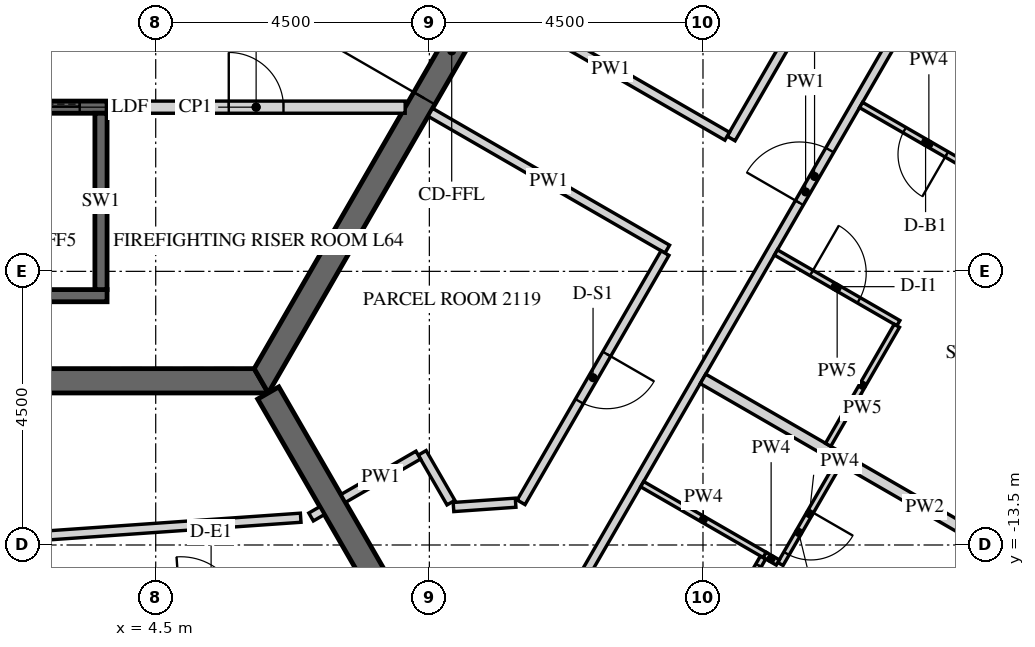
"""IFC4 building model, lengths in metres.
Left out: names, types, materials, properties, quantities, classifications, styles, units other than length and angle.
Written with IfcOpenShell. Run it as: python <this file> out.ifc"""

import sys

from ifc_helpers import new_model, si_unit, direction, frame, frame_2d, origin, place, context, subcontext, project, spatial, polyline, rectangle, outline, extrude, element, fill, save


model = new_model("IFC4")
c1 = context("Model", 3, precision=1e-05, world=origin(), true_north=direction((0.0, 1.0)))
c2 = subcontext(c1, "Body", "Model", "MODEL_VIEW")
j1 = project(units=[si_unit("LENGTHUNIT", "METRE"), si_unit("PLANEANGLEUNIT", "RADIAN")], contexts=[c1])
p1 = place(None, origin())
s1 = spatial("IfcSite", under=j1, at=p1, CompositionType="ELEMENT")
p2 = place(p1, origin())
s2 = spatial("IfcBuilding", under=s1, at=p2, CompositionType="ELEMENT")
p3 = place(p2, frame((0.0, 0.0, 267.9)))
s3 = spatial("IfcBuildingStorey", under=s2, at=p3, CompositionType="ELEMENT", Elevation=267.9)
p4 = place(p3, frame((16.451, -23.005, -0.15), z_axis=(0.0, 0.0, 1.0), x_axis=(0.500003737743, 0.866023245787, 0.0)))
e1 = element("IfcWall", 1, at=p4, inside=s3, PredefinedType="SOLIDWALL", context=c2, shape_type="SweptSolid", body=[
    extrude(outline(polyline([(-0.021, -0.25), (25.468, -0.25), (25.421, 0.25), (0.021, 0.25), (-0.021, -0.25)])), origin(), (0.0, 0.0, 1.0), 3.9),
])
p5 = place(p4, frame((2.522, 0.0, 0.75)))
e2 = element("IfcOpeningElement", 2, at=p5, cuts=e1, PredefinedType="OPENING", context=c2, shape_type="SweptSolid", body=[
    extrude(rectangle(XDim=2.4, YDim=2.7, at=frame_2d((1.2, 1.35))), frame((0.0, 0.26, 0.0), z_axis=(0.0, -1.0, 0.0), x_axis=(1.0, 0.0, 0.0)), (0.0, 0.0, 1.0), 0.52),
])
p6 = place(p4, frame((6.122, 0.0, 0.75)))
e3 = element("IfcOpeningElement", 3, at=p6, cuts=e1, PredefinedType="OPENING", context=c2, shape_type="SweptSolid", body=[
    extrude(rectangle(XDim=2.4, YDim=2.7, at=frame_2d((1.2, 1.35))), frame((0.0, 0.26, 0.0), z_axis=(0.0, -1.0, 0.0), x_axis=(1.0, 0.0, 0.0)), (0.0, 0.0, 1.0), 0.52),
])
p7 = place(p4, frame((9.722, 0.0, 0.75)))
e4 = element("IfcOpeningElement", 4, at=p7, cuts=e1, PredefinedType="OPENING", context=c2, shape_type="SweptSolid", body=[
    extrude(rectangle(XDim=2.4, YDim=2.7, at=frame_2d((1.2, 1.35))), frame((0.0, 0.26, 0.0), z_axis=(0.0, -1.0, 0.0), x_axis=(1.0, 0.0, 0.0)), (0.0, 0.0, 1.0), 0.52),
])
p8 = place(p4, frame((13.323, 0.0, 0.75)))
e5 = element("IfcOpeningElement", 5, at=p8, cuts=e1, PredefinedType="OPENING", context=c2, shape_type="SweptSolid", body=[
    extrude(rectangle(XDim=2.4, YDim=2.7, at=frame_2d((1.2, 1.35))), frame((0.0, 0.26, 0.0), z_axis=(0.0, -1.0, 0.0), x_axis=(1.0, 0.0, 0.0)), (0.0, 0.0, 1.0), 0.52),
])
p9 = place(p4, frame((16.922, 0.0, 0.75)))
e6 = element("IfcOpeningElement", 6, at=p9, cuts=e1, PredefinedType="OPENING", context=c2, shape_type="SweptSolid", body=[
    extrude(rectangle(XDim=2.4, YDim=2.7, at=frame_2d((1.2, 1.35))), frame((0.0, 0.26, 0.0), z_axis=(0.0, -1.0, 0.0), x_axis=(1.0, 0.0, 0.0)), (0.0, 0.0, 1.0), 0.52),
])
p10 = place(p4, frame((20.522, 0.0, 0.75)))
e7 = element("IfcOpeningElement", 7, at=p10, cuts=e1, PredefinedType="OPENING", context=c2, shape_type="SweptSolid", body=[
    extrude(rectangle(XDim=2.4, YDim=2.7, at=frame_2d((1.2, 1.35))), frame((0.0, 0.26, 0.0), z_axis=(0.0, -1.0, 0.0), x_axis=(1.0, 0.0, 0.0)), (0.0, 0.0, 1.0), 0.52),
])
p11 = place(p3, frame((-6.235, -10.8, -0.15), z_axis=(0.0, 0.0, 1.0), x_axis=(1.0, 0.0, 0.0)))
e8 = element("IfcWall", 8, at=p11, inside=s3, PredefinedType="SHEAR", context=c2, shape_type="SweptSolid", body=[
    extrude(outline(polyline([(-0.115, -0.2), (12.586, -0.2), (12.355, 0.2), (0.115, 0.2), (-0.115, -0.2)])), origin(), (0.0, 0.0, 1.0), 3.9),
])
p12 = place(p3, frame((6.235, -10.8, -0.15), z_axis=(0.0, 0.0, 1.0), x_axis=(0.499996419489, 0.866027470984, 0.0)))
e9 = element("IfcWall", 9, at=p12, inside=s3, PredefinedType="SHEAR", context=c2, shape_type="SweptSolid", body=[
    extrude(outline(polyline([(-0.115, -0.2), (12.586, -0.2), (12.355, 0.2), (0.115, 0.2), (-0.115, -0.2)])), origin(), (0.0, 0.0, 1.0), 3.9),
])
p13 = place(p12, frame((5.364, 0.0, 0.15)))
e10 = element("IfcOpeningElement", 10, at=p13, cuts=e9, PredefinedType="OPENING", context=c2, shape_type="SweptSolid", body=[
    extrude(rectangle(XDim=1.8, YDim=2.4, at=frame_2d((0.9, 1.2))), frame((0.0, 0.21, 0.0), z_axis=(0.0, -1.0, 0.0), x_axis=(1.0, 0.0, 0.0)), (0.0, 0.0, 1.0), 0.42),
])
p14 = place(p3, frame((6.351, -11.0, -0.15), z_axis=(0.0, 0.0, 1.0), x_axis=(0.499998894578, -0.866026041999, 0.0)))
e11 = element("IfcWall", 11, at=p14, inside=s3, PredefinedType="SHEAR", context=c2, shape_type="SweptSolid", body=[
    extrude(rectangle(XDim=15.544, YDim=0.4, at=frame_2d((7.772, 0.0))), origin(), (0.0, 0.0, 1.0), 3.9),
])
p15 = place(p14, frame((6.872, 0.0, 0.15)))
e12 = element("IfcOpeningElement", 12, at=p15, cuts=e11, PredefinedType="OPENING", context=c2, shape_type="SweptSolid", body=[
    extrude(rectangle(XDim=1.8, YDim=2.4, at=frame_2d((0.9, 1.2))), frame((0.0, 0.21, 0.0), z_axis=(0.0, -1.0, 0.0), x_axis=(1.0, 0.0, 0.0)), (0.0, 0.0, 1.0), 0.42),
])
p16 = place(p3, frame((-5.5, -6.3, -0.25), z_axis=(0.0, 0.0, 1.0), x_axis=(1.0, 0.0, 0.0)))
e13 = element("IfcWall", 13, at=p16, inside=s3, PredefinedType="SHEAR", context=c2, shape_type="SweptSolid", body=[
    extrude(rectangle(XDim=9.2, YDim=0.2, at=frame_2d((4.6, 0.0))), origin(), (0.0, 0.0, 1.0), 3.9),
])
p17 = place(p16, frame((0.45, 0.0, 0.25)))
e14 = element("IfcOpeningElement", 14, at=p17, cuts=e13, PredefinedType="OPENING", context=c2, shape_type="SweptSolid", body=[
    extrude(rectangle(XDim=1.1, YDim=2.1, at=frame_2d((0.55, 1.05))), frame((0.0, 0.11, 0.0), z_axis=(0.0, -1.0, 0.0), x_axis=(1.0, 0.0, 0.0)), (0.0, 0.0, 1.0), 0.22),
])
p18 = place(p16, frame((2.25, 0.0, 0.25)))
e15 = element("IfcOpeningElement", 15, at=p18, cuts=e13, PredefinedType="OPENING", context=c2, shape_type="SweptSolid", body=[
    extrude(rectangle(XDim=1.1, YDim=2.1, at=frame_2d((0.55, 1.05))), frame((0.0, 0.11, 0.0), z_axis=(0.0, -1.0, 0.0), x_axis=(1.0, 0.0, 0.0)), (0.0, 0.0, 1.0), 0.22),
])
p19 = place(p16, frame((4.05, 0.0, 0.25)))
e16 = element("IfcOpeningElement", 16, at=p19, cuts=e13, PredefinedType="OPENING", context=c2, shape_type="SweptSolid", body=[
    extrude(rectangle(XDim=1.1, YDim=2.1, at=frame_2d((0.55, 1.05))), frame((0.0, 0.11, 0.0), z_axis=(0.0, -1.0, 0.0), x_axis=(1.0, 0.0, 0.0)), (0.0, 0.0, 1.0), 0.22),
])
p20 = place(p16, frame((5.85, 0.0, 0.25)))
e17 = element("IfcOpeningElement", 17, at=p20, cuts=e13, PredefinedType="OPENING", context=c2, shape_type="SweptSolid", body=[
    extrude(rectangle(XDim=1.1, YDim=2.1, at=frame_2d((0.55, 1.05))), frame((0.0, 0.11, 0.0), z_axis=(0.0, -1.0, 0.0), x_axis=(1.0, 0.0, 0.0)), (0.0, 0.0, 1.0), 0.22),
])
p21 = place(p16, frame((7.65, 0.0, 0.25)))
e18 = element("IfcOpeningElement", 18, at=p21, cuts=e13, PredefinedType="OPENING", context=c2, shape_type="SweptSolid", body=[
    extrude(rectangle(XDim=1.1, YDim=2.1, at=frame_2d((0.55, 1.05))), frame((0.0, 0.11, 0.0), z_axis=(0.0, -1.0, 0.0), x_axis=(1.0, 0.0, 0.0)), (0.0, 0.0, 1.0), 0.22),
])
p22 = place(p3, frame((-5.5, -9.4, -0.25), z_axis=(0.0, 0.0, 1.0), x_axis=(1.0, 0.0, 0.0)))
e19 = element("IfcWall", 19, at=p22, inside=s3, PredefinedType="SHEAR", context=c2, shape_type="SweptSolid", body=[
    extrude(rectangle(XDim=9.2, YDim=0.2, at=frame_2d((4.6, 0.0))), origin(), (0.0, 0.0, 1.0), 3.9),
])
p23 = place(p3, frame((3.6, -9.3, -0.25), z_axis=(0.0, 0.0, 1.0), x_axis=(0.0, 1.0, 0.0)))
e20 = element("IfcWall", 20, at=p23, inside=s3, PredefinedType="SHEAR", context=c2, shape_type="SweptSolid", body=[
    extrude(rectangle(XDim=2.9, YDim=0.2, at=frame_2d((1.45, 0.0))), origin(), (0.0, 0.0, 1.0), 3.9),
])
p24 = place(p3, frame((3.7, -6.3, 0.0), z_axis=(0.0, 0.0, 1.0), x_axis=(1.0, 0.0, 0.0)))
e21 = element("IfcWall", 21, at=p24, inside=s3, PredefinedType="PARTITIONING", context=c2, shape_type="SweptSolid", body=[
    extrude(rectangle(XDim=4.903, YDim=0.2, at=frame_2d((2.451, 0.0))), origin(), (0.0, 0.0, 1.0), 3.65),
])
p25 = place(p24, frame((2.001, 0.0, 0.0)))
e22 = element("IfcOpeningElement", 22, at=p25, cuts=e21, PredefinedType="OPENING", context=c2, shape_type="SweptSolid", body=[
    extrude(rectangle(XDim=0.9, YDim=2.1, at=frame_2d((0.45, 1.05))), frame((0.0, 0.11, 0.0), z_axis=(0.0, -1.0, 0.0), x_axis=(1.0, 0.0, 0.0)), (0.0, 0.0, 1.0), 0.22),
])
p26 = place(p3, frame((7.237, -12.935, 0.0), z_axis=(0.0, 0.0, 1.0), x_axis=(-0.866088799389, -0.499890179513, 0.0)))
e23 = element("IfcWall", 23, at=p26, inside=s3, PredefinedType="PARTITIONING", context=c2, shape_type="SweptSolid", body=[
    extrude(rectangle(XDim=0.21, YDim=0.15, at=frame_2d((0.105, 0.0))), origin(), (0.0, 0.0, 1.0), 2.988),
])
p27 = place(p3, frame((6.884, -13.052, 0.0), z_axis=(0.0, 0.0, 1.0), x_axis=(-0.997564224443, -0.069753982764, 0.0)))
e24 = element("IfcWall", 24, at=p27, inside=s3, PredefinedType="PARTITIONING", context=c2, shape_type="SweptSolid", body=[
    extrude(rectangle(XDim=16.618, YDim=0.15, at=frame_2d((8.309, 0.0))), origin(), (0.0, 0.0, 1.0), 2.988),
])
p28 = place(p27, frame((7.859, 0.0, 0.0)))
e25 = element("IfcOpeningElement", 25, at=p28, cuts=e24, PredefinedType="OPENING", context=c2, shape_type="SweptSolid", body=[
    extrude(rectangle(XDim=0.9, YDim=2.1, at=frame_2d((0.45, 1.05))), frame((0.0, 0.085, 0.0), z_axis=(0.0, -1.0, 0.0), x_axis=(1.0, 0.0, 0.0)), (0.0, 0.0, 1.0), 0.17),
])
p29 = place(p3, frame((11.454, -14.16, 0.0), z_axis=(0.0, 0.0, 1.0), x_axis=(0.500000296604, 0.86602523254, 0.0)))
e26 = element("IfcWall", 26, at=p29, inside=s3, PredefinedType="PARTITIONING", context=c2, shape_type="SweptSolid", body=[
    extrude(rectangle(XDim=14.934, YDim=0.15, at=frame_2d((7.467, 0.0))), origin(), (0.0, 0.0, 1.0), 2.988),
])
p30 = place(p29, frame((7.261, 0.0, 0.0)))
e27 = element("IfcOpeningElement", 27, at=p30, cuts=e26, PredefinedType="OPENING", context=c2, shape_type="SweptSolid", body=[
    extrude(rectangle(XDim=1.0, YDim=2.1, at=frame_2d((0.5, 1.05))), frame((0.0, 0.085, 0.0), z_axis=(0.0, -1.0, 0.0), x_axis=(1.0, 0.0, 0.0)), (0.0, 0.0, 1.0), 0.17),
])
p31 = place(p29, frame((13.784, 0.0, 0.0)))
e28 = element("IfcOpeningElement", 28, at=p31, cuts=e26, PredefinedType="OPENING", context=c2, shape_type="SweptSolid", body=[
    extrude(rectangle(XDim=1.0, YDim=2.1, at=frame_2d((0.5, 1.05))), frame((0.0, 0.085, 0.0), z_axis=(0.0, -1.0, 0.0), x_axis=(1.0, 0.0, 0.0)), (0.0, 0.0, 1.0), 0.17),
])
p32 = place(p3, frame((17.112, -1.362, 0.0), z_axis=(0.0, 0.0, 1.0), x_axis=(-0.49999985423, -0.866025487945, 0.0)))
e29 = element("IfcWall", 29, at=p32, inside=s3, PredefinedType="PARTITIONING", context=c2, shape_type="SweptSolid", body=[
    extrude(rectangle(XDim=6.298, YDim=0.15, at=frame_2d((3.149, 0.0))), origin(), (0.0, 0.0, 1.0), 2.988),
])
p33 = place(p3, frame((13.898, -6.778, 0.0), z_axis=(0.0, 0.0, 1.0), x_axis=(-0.866041342403, 0.499972392486, 0.0)))
e30 = element("IfcWall", 30, at=p33, inside=s3, PredefinedType="PARTITIONING", context=c2, shape_type="SweptSolid", body=[
    extrude(rectangle(XDim=4.425, YDim=0.15, at=frame_2d((2.212, 0.0))), origin(), (0.0, 0.0, 1.0), 2.988),
])
p34 = place(p3, frame((9.016, -6.384, 0.0), z_axis=(0.0, 0.0, 1.0), x_axis=(0.866031096941, -0.499990139034, 0.0)))
e31 = element("IfcWall", 31, at=p34, inside=s3, PredefinedType="PARTITIONING", context=c2, shape_type="SweptSolid", body=[
    extrude(rectangle(XDim=4.5, YDim=0.15, at=frame_2d((2.25, 0.0))), origin(), (0.0, 0.0, 1.0), 2.988),
])
p35 = place(p3, frame((12.875, -8.699, 0.0), z_axis=(0.0, 0.0, 1.0), x_axis=(-0.49999482868, -0.866028389427, 0.0)))
e32 = element("IfcWall", 32, at=p35, inside=s3, PredefinedType="PARTITIONING", context=c2, shape_type="SweptSolid", body=[
    extrude(rectangle(XDim=4.733, YDim=0.15, at=frame_2d((2.366, 0.0))), origin(), (0.0, 0.0, 1.0), 2.988),
])
p36 = place(p35, frame((1.917, 0.0, 0.0)))
e33 = element("IfcOpeningElement", 33, at=p36, cuts=e32, PredefinedType="OPENING", context=c2, shape_type="SweptSolid", body=[
    extrude(rectangle(XDim=0.9, YDim=2.1, at=frame_2d((0.45, 1.05))), frame((0.0, 0.085, 0.0), z_axis=(0.0, -1.0, 0.0), x_axis=(1.0, 0.0, 0.0)), (0.0, 0.0, 1.0), 0.17),
])
p37 = place(p3, frame((10.419, -12.804, 0.0), z_axis=(0.0, 0.0, 1.0), x_axis=(-0.997558136861, -0.069840987838, 0.0)))
e34 = element("IfcWall", 34, at=p37, inside=s3, PredefinedType="PARTITIONING", context=c2, shape_type="SweptSolid", body=[
    extrude(rectangle(XDim=1.024, YDim=0.15, at=frame_2d((0.512, 0.0))), origin(), (0.0, 0.0, 1.0), 2.988),
])
p38 = place(p3, frame((9.355, -12.804, 0.0), z_axis=(0.0, 0.0, 1.0), x_axis=(-0.499998034377, 0.866026538634, 0.0)))
e35 = element("IfcWall", 35, at=p38, inside=s3, PredefinedType="PARTITIONING", context=c2, shape_type="SweptSolid", body=[
    extrude(rectangle(XDim=0.946, YDim=0.15, at=frame_2d((0.473, 0.0))), origin(), (0.0, 0.0, 1.0), 2.988),
])
p39 = place(p3, frame((8.817, -12.022, 0.0), z_axis=(0.0, 0.0, 1.0), x_axis=(-0.866062911188, -0.499935029643, 0.0)))
e36 = element("IfcWall", 36, at=p39, inside=s3, PredefinedType="PARTITIONING", context=c2, shape_type="SweptSolid", body=[
    extrude(rectangle(XDim=1.425, YDim=0.15, at=frame_2d((0.712, 0.0))), origin(), (0.0, 0.0, 1.0), 2.988),
])
p40 = place(p3, frame((15.728, -12.158, 0.0), z_axis=(0.0, 0.0, 1.0), x_axis=(-0.499947453424, -0.866055739439, 0.0)))
e37 = element("IfcWall", 37, at=p40, inside=s3, PredefinedType="PARTITIONING", context=c2, shape_type="SweptSolid", body=[
    extrude(rectangle(XDim=1.91, YDim=0.1, at=frame_2d((0.955, 0.0))), origin(), (0.0, 0.0, 1.0), 2.988),
])
p41 = place(p40, frame((0.91, 0.0, 0.0)))
e38 = element("IfcOpeningElement", 38, at=p41, cuts=e37, PredefinedType="OPENING", context=c2, shape_type="SweptSolid", body=[
    extrude(rectangle(XDim=0.8, YDim=2.1, at=frame_2d((0.4, 1.05))), frame((0.0, 0.06, 0.0), z_axis=(0.0, -1.0, 0.0), x_axis=(1.0, 0.0, 0.0)), (0.0, 0.0, 1.0), 0.12),
])
p42 = place(p3, frame((14.73, -13.787, 0.0), z_axis=(0.0, 0.0, 1.0), x_axis=(-0.865669265636, 0.500616342655, 0.0)))
e39 = element("IfcWall", 39, at=p42, inside=s3, PredefinedType="PARTITIONING", context=c2, shape_type="SweptSolid", body=[
    extrude(rectangle(XDim=0.252, YDim=0.1, at=frame_2d((0.126, 0.0))), origin(), (0.0, 0.0, 1.0), 2.988),
])
p43 = place(p3, frame((14.488, -13.706, 0.0), z_axis=(0.0, 0.0, 1.0), x_axis=(-0.500035721725, -0.866004778855, 0.0)))
e40 = element("IfcWall", 40, at=p43, inside=s3, PredefinedType="PARTITIONING", context=c2, shape_type="SweptSolid", body=[
    extrude(rectangle(XDim=2.001, YDim=0.1, at=frame_2d((1.0, 0.0))), origin(), (0.0, 0.0, 1.0), 2.988),
])
p44 = place(p43, frame((0.15, 0.0, 0.0)))
e41 = element("IfcOpeningElement", 41, at=p44, cuts=e40, PredefinedType="OPENING", context=c2, shape_type="SweptSolid", body=[
    extrude(rectangle(XDim=0.9, YDim=2.1, at=frame_2d((0.45, 1.05))), frame((0.0, 0.06, 0.0), z_axis=(0.0, -1.0, 0.0), x_axis=(1.0, 0.0, 0.0)), (0.0, 0.0, 1.0), 0.12),
])
p45 = place(p3, frame((20.796, -14.98, 0.0), z_axis=(0.0, 0.0, 1.0), x_axis=(-0.866021515814, 0.500006734102, 0.0)))
e42 = element("IfcWall", 42, at=p45, inside=s3, PredefinedType="PARTITIONING", context=c2, shape_type="SweptSolid", body=[
    extrude(rectangle(XDim=8.425, YDim=0.18, at=frame_2d((4.213, 0.0))), origin(), (0.0, 0.0, 1.0), 2.988),
])
p46 = place(p3, frame((12.5, -12.5, 0.0), z_axis=(0.0, 0.0, 1.0), x_axis=(0.865998469481, -0.500046648681, 0.0)))
e43 = element("IfcWall", 43, at=p46, inside=s3, PredefinedType="PARTITIONING", context=c2, shape_type="SweptSolid", body=[
    extrude(rectangle(XDim=2.325, YDim=0.1, at=frame_2d((1.163, 0.0))), origin(), (0.0, 0.0, 1.0), 2.988),
])
p47 = place(p3, frame((18.33, -7.552, 0.0), z_axis=(0.0, 0.0, 1.0), x_axis=(-0.866046643894, 0.499963209246, 0.0)))
e44 = element("IfcWall", 44, at=p47, inside=s3, PredefinedType="PARTITIONING", context=c2, shape_type="SweptSolid", body=[
    extrude(rectangle(XDim=2.575, YDim=0.1, at=frame_2d((1.288, 0.0))), origin(), (0.0, 0.0, 1.0), 2.988),
])
p48 = place(p47, frame((0.95, 0.0, 0.0)))
e45 = element("IfcOpeningElement", 45, at=p48, cuts=e44, PredefinedType="OPENING", context=c2, shape_type="SweptSolid", body=[
    extrude(rectangle(XDim=0.8, YDim=2.1, at=frame_2d((0.4, 1.05))), frame((0.0, 0.06, 0.0), z_axis=(0.0, -1.0, 0.0), x_axis=(1.0, 0.0, 0.0)), (0.0, 0.0, 1.0), 0.12),
])
p49 = place(p3, frame((14.7, -8.689, 0.0), z_axis=(0.0, 0.0, 1.0), x_axis=(0.866024722723, -0.500001179632, 0.0)))
e46 = element("IfcWall", 46, at=p49, inside=s3, PredefinedType="PARTITIONING", context=c2, shape_type="SweptSolid", body=[
    extrude(rectangle(XDim=2.325, YDim=0.1, at=frame_2d((1.163, 0.0))), origin(), (0.0, 0.0, 1.0), 2.988),
])
p50 = place(p49, frame((0.675, 0.0, 0.0)))
e47 = element("IfcOpeningElement", 47, at=p50, cuts=e46, PredefinedType="OPENING", context=c2, shape_type="SweptSolid", body=[
    extrude(rectangle(XDim=0.9, YDim=2.1, at=frame_2d((0.45, 1.05))), frame((0.0, 0.06, 0.0), z_axis=(0.0, -1.0, 0.0), x_axis=(1.0, 0.0, 0.0)), (0.0, 0.0, 1.0), 0.12),
])
p51 = place(p3, frame((16.688, -9.895, 0.0), z_axis=(0.0, 0.0, 1.0), x_axis=(-0.49995000081, -0.866054268906, 0.0)))
e48 = element("IfcWall", 48, at=p51, inside=s3, PredefinedType="PARTITIONING", context=c2, shape_type="SweptSolid", body=[
    extrude(rectangle(XDim=2.26, YDim=0.1, at=frame_2d((1.13, 0.0))), origin(), (0.0, 0.0, 1.0), 2.988),
])
p52 = place(p3, frame((24.396, -8.745, 0.0), z_axis=(0.0, 0.0, 1.0), x_axis=(-0.866014270972, 0.500019282102, 0.0)))
e49 = element("IfcWall", 49, at=p52, inside=s3, PredefinedType="PARTITIONING", context=c2, shape_type="SweptSolid", body=[
    extrude(rectangle(XDim=8.425, YDim=0.18, at=frame_2d((4.212, 0.0))), origin(), (0.0, 0.0, 1.0), 2.988),
])
p53 = place(p13, origin())
e50 = element("IfcDoor", 50, at=p53, inside=s3, OperationType="DOUBLE_DOOR_SINGLE_SWING", PredefinedType="DOOR", context=c2, shape_type="SweptSolid", body=[
    extrude(rectangle(XDim=1.8, YDim=2.4, at=frame_2d((0.9, 1.2))), frame((0.0, 0.025, 0.0), z_axis=(0.0, -1.0, 0.0), x_axis=(1.0, 0.0, 0.0)), (0.0, 0.0, 1.0), 0.05),
])
fill(e10, e50)
p54 = place(p25, origin())
e51 = element("IfcDoor", 51, at=p54, inside=s3, OperationType="SINGLE_SWING_LEFT", PredefinedType="DOOR", context=c2, shape_type="SweptSolid", body=[
    extrude(rectangle(XDim=0.9, YDim=2.1, at=frame_2d((0.45, 1.05))), frame((0.0, 0.025, 0.0), z_axis=(0.0, -1.0, 0.0), x_axis=(1.0, 0.0, 0.0)), (0.0, 0.0, 1.0), 0.05),
])
fill(e22, e51)
p55 = place(p21, origin())
e52 = element("IfcDoor", 52, at=p55, inside=s3, OperationType="SLIDING_TO_LEFT", PredefinedType="DOOR", context=c2, shape_type="SweptSolid", body=[
    extrude(rectangle(XDim=1.1, YDim=2.1, at=frame_2d((0.55, 1.05))), frame((0.0, 0.025, 0.0), z_axis=(0.0, -1.0, 0.0), x_axis=(1.0, 0.0, 0.0)), (0.0, 0.0, 1.0), 0.05),
])
fill(e18, e52)
p56 = place(p41, origin())
e53 = element("IfcDoor", 53, at=p56, inside=s3, OperationType="SINGLE_SWING_LEFT", PredefinedType="DOOR", context=c2, shape_type="SweptSolid", body=[
    extrude(rectangle(XDim=0.8, YDim=2.1, at=frame_2d((0.4, 1.05))), frame((0.0, 0.025, 0.0), z_axis=(0.0, -1.0, 0.0), x_axis=(1.0, 0.0, 0.0)), (0.0, 0.0, 1.0), 0.05),
])
fill(e38, e53)
p57 = place(p44, origin())
e54 = element("IfcDoor", 54, at=p57, inside=s3, OperationType="SINGLE_SWING_RIGHT", PredefinedType="DOOR", context=c2, shape_type="SweptSolid", body=[
    extrude(rectangle(XDim=0.9, YDim=2.1, at=frame_2d((0.45, 1.05))), frame((0.0, 0.025, 0.0), z_axis=(0.0, -1.0, 0.0), x_axis=(1.0, 0.0, 0.0)), (0.0, 0.0, 1.0), 0.05),
])
fill(e41, e54)
p58 = place(p30, origin())
e55 = element("IfcDoor", 55, at=p58, inside=s3, OperationType="SINGLE_SWING_RIGHT", PredefinedType="DOOR", context=c2, shape_type="SweptSolid", body=[
    extrude(rectangle(XDim=1.0, YDim=2.1, at=frame_2d((0.5, 1.05))), frame((0.0, 0.025, 0.0), z_axis=(0.0, -1.0, 0.0), x_axis=(1.0, 0.0, 0.0)), (0.0, 0.0, 1.0), 0.05),
])
fill(e27, e55)
p59 = place(p48, origin())
e56 = element("IfcDoor", 56, at=p59, inside=s3, OperationType="SINGLE_SWING_LEFT", PredefinedType="DOOR", context=c2, shape_type="SweptSolid", body=[
    extrude(rectangle(XDim=0.8, YDim=2.1, at=frame_2d((0.4, 1.05))), frame((0.0, 0.025, 0.0), z_axis=(0.0, -1.0, 0.0), x_axis=(1.0, 0.0, 0.0)), (0.0, 0.0, 1.0), 0.05),
])
fill(e45, e56)
p60 = place(p50, origin())
e57 = element("IfcDoor", 57, at=p60, inside=s3, OperationType="SINGLE_SWING_RIGHT", PredefinedType="DOOR", context=c2, shape_type="SweptSolid", body=[
    extrude(rectangle(XDim=0.9, YDim=2.1, at=frame_2d((0.45, 1.05))), frame((0.0, 0.025, 0.0), z_axis=(0.0, -1.0, 0.0), x_axis=(1.0, 0.0, 0.0)), (0.0, 0.0, 1.0), 0.05),
])
fill(e47, e57)
p61 = place(p36, origin())
e58 = element("IfcDoor", 58, at=p61, inside=s3, OperationType="SINGLE_SWING_LEFT", PredefinedType="DOOR", context=c2, shape_type="SweptSolid", body=[
    extrude(rectangle(XDim=0.9, YDim=2.1, at=frame_2d((0.45, 1.05))), frame((0.0, 0.025, 0.0), z_axis=(0.0, -1.0, 0.0), x_axis=(1.0, 0.0, 0.0)), (0.0, 0.0, 1.0), 0.05),
])
fill(e33, e58)
save(model, sys.argv[1])
